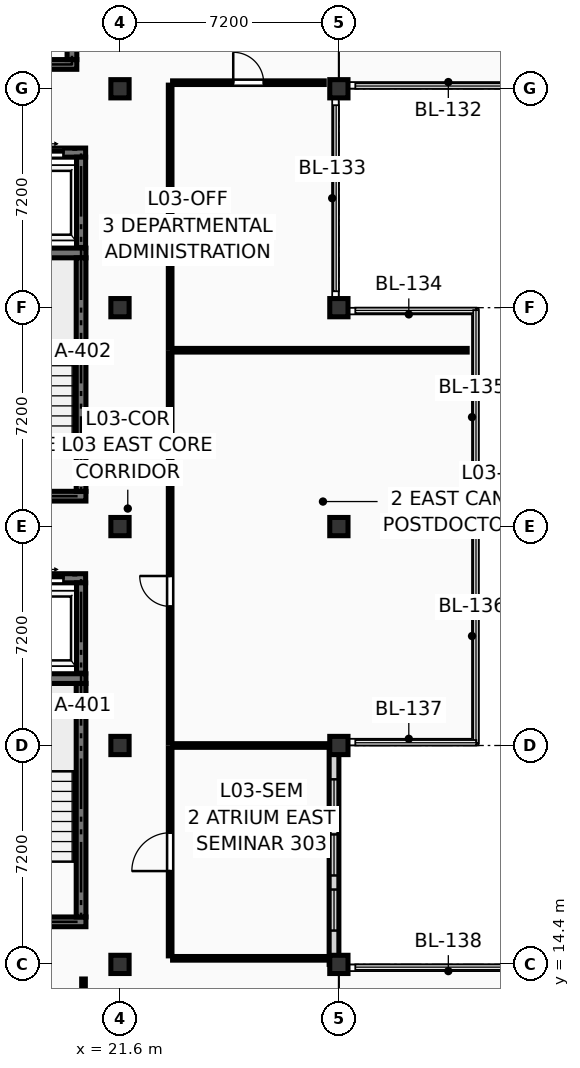
"""IFC4 building model, lengths in metres.
Left out: names, types, materials, properties, quantities, classifications, styles, units other than length and angle.
Written with IfcOpenShell. Run it as: python <this file> out.ifc"""

import sys

from ifc_helpers import new_model, si_unit, direction, frame, frame_2d, origin, origin_2d, place, context, subcontext, project, spatial, rectangle, extrude, element, fill, save


model = new_model("IFC4")
c1 = context("Model", 3, precision=1e-05, world=origin(), true_north=direction((0.0, 1.0)))
c2 = subcontext(c1, "Body", "Model", "MODEL_VIEW")
j1 = project(units=[si_unit("LENGTHUNIT", "METRE"), si_unit("PLANEANGLEUNIT", "RADIAN")], contexts=[c1])
p1 = place(None, origin())
s1 = spatial("IfcSite", under=j1, at=p1, CompositionType="ELEMENT")
p2 = place(p1, origin())
s2 = spatial("IfcBuilding", under=s1, at=p2, CompositionType="ELEMENT")
p3 = place(p2, frame((0.0, 0.0, 12.15)))
s3 = spatial("IfcBuildingStorey", under=s2, at=p3, CompositionType="ELEMENT", Elevation=12.15)
for number, where, z_axis, x_axis in (
    (1, (21.6, 14.4, 0.0), (0.0, 0.0, 1.0), (1.0, 0.0, 0.0)),
    (2, (21.6, 21.6, 0.0), (0.0, 0.0, 1.0), (1.0, 0.0, 0.0)),
    (3, (21.6, 28.8, 0.0), (0.0, 0.0, 1.0), (1.0, 0.0, 0.0)),
    (4, (21.6, 36.0, 0.0), (0.0, 0.0, 1.0), (1.0, 0.0, 0.0)),
    (5, (21.6, 43.2, 0.0), (0.0, 0.0, 1.0), (1.0, 0.0, 0.0)),
    (6, (28.8, 14.4, 0.0), (0.0, 0.0, 1.0), (1.0, 0.0, 0.0)),
    (7, (28.8, 21.6, 0.0), (0.0, 0.0, 1.0), (1.0, 0.0, 0.0)),
    (8, (28.8, 28.8, 0.0), (0.0, 0.0, 1.0), (1.0, 0.0, 0.0)),
    (9, (28.8, 36.0, 0.0), (0.0, 0.0, 1.0), (1.0, 0.0, 0.0)),
    (10, (28.8, 43.2, 0.0), (0.0, 0.0, 1.0), (1.0, 0.0, 0.0)),
):
    element("IfcColumn", number, at=place(p3, frame(where, z_axis=z_axis, x_axis=x_axis)), inside=s3, PredefinedType="COLUMN", context=c2, shape_type="SweptSolid", body=[
        extrude(rectangle(XDim=0.6, YDim=0.6, at=origin_2d()), origin(), (0.0, 0.0, 1.0), 3.6),
    ])
p4 = place(p3, frame((28.64, 14.4, 0.0), z_axis=(0.0, 0.0, 1.0), x_axis=(0.0, 1.0, 0.0)))
e11 = element("IfcWall", 11, at=p4, inside=s3, PredefinedType="SOLIDWALL", context=c2, shape_type="SweptSolid", body=[
    extrude(rectangle(XDim=7.2, YDim=0.32, at=frame_2d((3.6, 0.0))), origin(), (0.0, 0.0, 1.0), 2.84),
])
p5 = place(p4, frame((1.113, 0.0, 0.18)))
e12 = element("IfcOpeningElement", 12, at=p5, cuts=e11, PredefinedType="OPENING", context=c2, shape_type="SweptSolid", body=[
    extrude(rectangle(XDim=1.35, YDim=2.45, at=frame_2d((0.675, 1.225))), frame((0.0, 0.172, 0.0), z_axis=(0.0, -1.0, 0.0), x_axis=(1.0, 0.0, 0.0)), (0.0, 0.0, 1.0), 0.344),
])
p6 = place(p4, frame((2.925, 0.0, 0.18)))
e13 = element("IfcOpeningElement", 13, at=p6, cuts=e11, PredefinedType="OPENING", context=c2, shape_type="SweptSolid", body=[
    extrude(rectangle(XDim=1.35, YDim=2.45, at=frame_2d((0.675, 1.225))), frame((0.0, 0.172, 0.0), z_axis=(0.0, -1.0, 0.0), x_axis=(1.0, 0.0, 0.0)), (0.0, 0.0, 1.0), 0.344),
])
p7 = place(p4, frame((4.738, 0.0, 0.18)))
e14 = element("IfcOpeningElement", 14, at=p7, cuts=e11, PredefinedType="OPENING", context=c2, shape_type="SweptSolid", body=[
    extrude(rectangle(XDim=1.35, YDim=2.45, at=frame_2d((0.675, 1.225))), frame((0.0, 0.172, 0.0), z_axis=(0.0, -1.0, 0.0), x_axis=(1.0, 0.0, 0.0)), (0.0, 0.0, 1.0), 0.344),
])
for number, where, z_axis, x_axis in (
    (15, (15.64, 15.8, 0.0), (0.0, 0.0, 1.0), (1.0, 0.0, 0.0)),
    (16, (15.64, 23.8, 0.0), (0.0, 0.0, 1.0), (1.0, 0.0, 0.0)),
):
    element("IfcWall", number, at=place(p3, frame(where, z_axis=z_axis, x_axis=x_axis)), inside=s3, PredefinedType="SHEAR", context=c2, shape_type="SweptSolid", body=[
        extrude(rectangle(XDim=4.84, YDim=0.32, at=frame_2d((2.42, 0.0))), origin(), (0.0, 0.0, 1.0), 3.39),
    ])
p8 = place(p3, frame((20.32, 15.96, 0.0), z_axis=(0.0, 0.0, 1.0), x_axis=(0.0, 1.0, 0.0)))
e17 = element("IfcWall", 17, at=p8, inside=s3, PredefinedType="SHEAR", context=c2, shape_type="SweptSolid", body=[
    extrude(rectangle(XDim=7.68, YDim=0.32, at=frame_2d((3.84, 0.0))), origin(), (0.0, 0.0, 1.0), 3.39),
])
for number, where, z_axis, x_axis in (
    (18, (15.64, 29.8, 0.0), (0.0, 0.0, 1.0), (1.0, 0.0, 0.0)),
    (19, (15.64, 37.8, 0.0), (0.0, 0.0, 1.0), (1.0, 0.0, 0.0)),
):
    element("IfcWall", number, at=place(p3, frame(where, z_axis=z_axis, x_axis=x_axis)), inside=s3, PredefinedType="SHEAR", context=c2, shape_type="SweptSolid", body=[
        extrude(rectangle(XDim=4.84, YDim=0.32, at=frame_2d((2.42, 0.0))), origin(), (0.0, 0.0, 1.0), 3.39),
    ])
p9 = place(p3, frame((20.32, 29.96, 0.0), z_axis=(0.0, 0.0, 1.0), x_axis=(0.0, 1.0, 0.0)))
e20 = element("IfcWall", 20, at=p9, inside=s3, PredefinedType="SHEAR", context=c2, shape_type="SweptSolid", body=[
    extrude(rectangle(XDim=7.68, YDim=0.32, at=frame_2d((3.84, 0.0))), origin(), (0.0, 0.0, 1.0), 3.39),
])
p10 = place(p3, frame((15.74, 44.0, 0.0), z_axis=(0.0, 0.0, 1.0), x_axis=(1.0, 0.0, 0.0)))
e21 = element("IfcWall", 21, at=p10, inside=s3, PredefinedType="SHEAR", context=c2, shape_type="SweptSolid", body=[
    extrude(rectangle(XDim=4.44, YDim=0.32, at=frame_2d((2.22, 0.0))), origin(), (0.0, 0.0, 1.0), 3.39),
])
p11 = place(p3, frame((20.02, 44.16, 0.0), z_axis=(0.0, 0.0, 1.0), x_axis=(0.0, 1.0, 0.0)))
e22 = element("IfcWall", 22, at=p11, inside=s3, PredefinedType="SHEAR", context=c2, shape_type="SweptSolid", body=[
    extrude(rectangle(XDim=7.28, YDim=0.32, at=frame_2d((3.64, 0.0))), origin(), (0.0, 0.0, 1.0), 3.39),
])
p12 = place(p3, frame((17.91, 27.1, 0.0), z_axis=(0.0, 0.0, 1.0), x_axis=(1.0, 0.0, 0.0)))
e23 = element("IfcWall", 23, at=p12, inside=s3, PredefinedType="SHEAR", context=c2, shape_type="SweptSolid", body=[
    extrude(rectangle(XDim=2.56, YDim=0.3, at=frame_2d((1.28, 0.0))), origin(), (0.0, 0.0, 1.0), 3.39),
])
p13 = place(p12, frame((0.73, 0.0, 0.0)))
e24 = element("IfcOpeningElement", 24, at=p13, cuts=e23, PredefinedType="OPENING", context=c2, shape_type="SweptSolid", body=[
    extrude(rectangle(XDim=1.1, YDim=2.2, at=frame_2d((0.55, 1.1))), frame((0.0, 0.162, 0.0), z_axis=(0.0, -1.0, 0.0), x_axis=(1.0, 0.0, 0.0)), (0.0, 0.0, 1.0), 0.324),
])
p14 = place(p3, frame((20.32, 23.98, 0.0), z_axis=(0.0, 0.0, 1.0), x_axis=(0.0, 1.0, 0.0)))
e25 = element("IfcWall", 25, at=p14, inside=s3, PredefinedType="SHEAR", context=c2, shape_type="SweptSolid", body=[
    extrude(rectangle(XDim=2.97, YDim=0.3, at=frame_2d((1.485, 0.0))), origin(), (0.0, 0.0, 1.0), 3.39),
])
p15 = place(p3, frame((17.91, 41.1, 0.0), z_axis=(0.0, 0.0, 1.0), x_axis=(1.0, 0.0, 0.0)))
e26 = element("IfcWall", 26, at=p15, inside=s3, PredefinedType="SHEAR", context=c2, shape_type="SweptSolid", body=[
    extrude(rectangle(XDim=2.56, YDim=0.3, at=frame_2d((1.28, 0.0))), origin(), (0.0, 0.0, 1.0), 3.39),
])
p16 = place(p15, frame((0.73, 0.0, 0.0)))
e27 = element("IfcOpeningElement", 27, at=p16, cuts=e26, PredefinedType="OPENING", context=c2, shape_type="SweptSolid", body=[
    extrude(rectangle(XDim=1.1, YDim=2.2, at=frame_2d((0.55, 1.1))), frame((0.0, 0.162, 0.0), z_axis=(0.0, -1.0, 0.0), x_axis=(1.0, 0.0, 0.0)), (0.0, 0.0, 1.0), 0.324),
])
p17 = place(p3, frame((20.32, 37.98, 0.0), z_axis=(0.0, 0.0, 1.0), x_axis=(0.0, 1.0, 0.0)))
e28 = element("IfcWall", 28, at=p17, inside=s3, PredefinedType="SHEAR", context=c2, shape_type="SweptSolid", body=[
    extrude(rectangle(XDim=2.97, YDim=0.3, at=frame_2d((1.485, 0.0))), origin(), (0.0, 0.0, 1.0), 3.39),
])
p18 = place(p3, frame((20.4, 9.48, 0.0), z_axis=(0.0, 0.0, 1.0), x_axis=(0.0, 1.0, 0.0)))
e29 = element("IfcWall", 29, at=p18, inside=s3, PredefinedType="PARTITIONING", context=c2, shape_type="SweptSolid", body=[
    extrude(rectangle(XDim=4.44, YDim=0.12, at=frame_2d((2.22, 0.0))), origin(), (0.0, 0.0, 1.0), 3.375),
])
p19 = place(p3, frame((23.25, 14.68, 0.0), z_axis=(0.0, 0.0, 1.0), x_axis=(0.0, 1.0, 0.0)))
e30 = element("IfcWall", 30, at=p19, inside=s3, PredefinedType="PARTITIONING", context=c2, shape_type="SweptSolid", body=[
    extrude(rectangle(XDim=6.84, YDim=0.12, at=frame_2d((3.42, 0.0))), origin(), (0.0, 0.0, 1.0), 3.375),
])
p20 = place(p19, frame((2.79, 0.0, 0.0)))
e31 = element("IfcOpeningElement", 31, at=p20, cuts=e30, PredefinedType="OPENING", context=c2, shape_type="SweptSolid", body=[
    extrude(rectangle(XDim=1.26, YDim=2.18, at=frame_2d((0.63, 1.09))), frame((0.0, 0.072, 0.0), z_axis=(0.0, -1.0, 0.0), x_axis=(1.0, 0.0, 0.0)), (0.0, 0.0, 1.0), 0.144),
])
p21 = place(p3, frame((23.33, 14.6, 0.0), z_axis=(0.0, 0.0, 1.0), x_axis=(1.0, 0.0, 0.0)))
e32 = element("IfcWall", 32, at=p21, inside=s3, PredefinedType="PARTITIONING", context=c2, shape_type="SweptSolid", body=[
    extrude(rectangle(XDim=5.09, YDim=0.12, at=frame_2d((2.545, 0.0))), origin(), (0.0, 0.0, 1.0), 2.595),
])
p22 = place(p3, frame((23.33, 21.6, 0.0), z_axis=(0.0, 0.0, 1.0), x_axis=(1.0, 0.0, 0.0)))
e33 = element("IfcWall", 33, at=p22, inside=s3, PredefinedType="PARTITIONING", context=c2, shape_type="SweptSolid", body=[
    extrude(rectangle(XDim=5.09, YDim=0.12, at=frame_2d((2.545, 0.0))), origin(), (0.0, 0.0, 1.0), 2.691),
])
p23 = place(p3, frame((23.25, 21.68, 0.0), z_axis=(0.0, 0.0, 1.0), x_axis=(0.0, 1.0, 0.0)))
e34 = element("IfcWall", 34, at=p23, inside=s3, PredefinedType="PARTITIONING", context=c2, shape_type="SweptSolid", body=[
    extrude(rectangle(XDim=12.84, YDim=0.12, at=frame_2d((6.42, 0.0))), origin(), (0.0, 0.0, 1.0), 3.375),
])
p24 = place(p23, frame((4.495, 0.0, 0.0)))
e35 = element("IfcOpeningElement", 35, at=p24, cuts=e34, PredefinedType="OPENING", context=c2, shape_type="SweptSolid", body=[
    extrude(rectangle(XDim=1.0, YDim=2.15, at=frame_2d((0.5, 1.075))), frame((0.0, 0.072, 0.0), z_axis=(0.0, -1.0, 0.0), x_axis=(1.0, 0.0, 0.0)), (0.0, 0.0, 1.0), 0.144),
])
p25 = place(p3, frame((23.33, 34.6, 0.0), z_axis=(0.0, 0.0, 1.0), x_axis=(1.0, 0.0, 0.0)))
e36 = element("IfcWall", 36, at=p25, inside=s3, PredefinedType="PARTITIONING", context=c2, shape_type="SweptSolid", body=[
    extrude(rectangle(XDim=9.69, YDim=0.12, at=frame_2d((4.845, 0.0))), origin(), (0.0, 0.0, 1.0), 3.375),
])
p26 = place(p3, frame((23.25, 34.68, 0.0), z_axis=(0.0, 0.0, 1.0), x_axis=(0.0, 1.0, 0.0)))
e37 = element("IfcWall", 37, at=p26, inside=s3, PredefinedType="PARTITIONING", context=c2, shape_type="SweptSolid", body=[
    extrude(rectangle(XDim=8.64, YDim=0.12, at=frame_2d((4.32, 0.0))), origin(), (0.0, 0.0, 1.0), 3.375),
])
p27 = place(p3, frame((23.33, 43.4, 0.0), z_axis=(0.0, 0.0, 1.0), x_axis=(1.0, 0.0, 0.0)))
e38 = element("IfcWall", 38, at=p27, inside=s3, PredefinedType="PARTITIONING", context=c2, shape_type="SweptSolid", body=[
    extrude(rectangle(XDim=4.99, YDim=0.12, at=frame_2d((2.495, 0.0))), origin(), (0.0, 0.0, 1.0), 2.691),
])
p28 = place(p27, frame((1.995, 0.0, 0.0)))
e39 = element("IfcOpeningElement", 39, at=p28, cuts=e38, PredefinedType="OPENING", context=c2, shape_type="SweptSolid", body=[
    extrude(rectangle(XDim=1.0, YDim=2.15, at=frame_2d((0.5, 1.075))), frame((0.0, 0.072, 0.0), z_axis=(0.0, -1.0, 0.0), x_axis=(1.0, 0.0, 0.0)), (0.0, 0.0, 1.0), 0.144),
])
p29 = place(p5, origin())
e40 = element("IfcWindow", 40, at=p29, inside=s3, PartitioningType="SINGLE_PANEL", PredefinedType="WINDOW", context=c2, shape_type="SweptSolid", body=[
    extrude(rectangle(XDim=1.35, YDim=2.45, at=frame_2d((0.675, 1.225))), frame((0.0, 0.03, 0.0), z_axis=(0.0, -1.0, 0.0), x_axis=(1.0, 0.0, 0.0)), (0.0, 0.0, 1.0), 0.06),
])
fill(e12, e40)
p30 = place(p6, origin())
e41 = element("IfcWindow", 41, at=p30, inside=s3, PartitioningType="SINGLE_PANEL", PredefinedType="WINDOW", context=c2, shape_type="SweptSolid", body=[
    extrude(rectangle(XDim=1.35, YDim=2.45, at=frame_2d((0.675, 1.225))), frame((0.0, 0.03, 0.0), z_axis=(0.0, -1.0, 0.0), x_axis=(1.0, 0.0, 0.0)), (0.0, 0.0, 1.0), 0.06),
])
fill(e13, e41)
p31 = place(p7, origin())
e42 = element("IfcWindow", 42, at=p31, inside=s3, PartitioningType="SINGLE_PANEL", PredefinedType="WINDOW", context=c2, shape_type="SweptSolid", body=[
    extrude(rectangle(XDim=1.35, YDim=2.45, at=frame_2d((0.675, 1.225))), frame((0.0, 0.03, 0.0), z_axis=(0.0, -1.0, 0.0), x_axis=(1.0, 0.0, 0.0)), (0.0, 0.0, 1.0), 0.06),
])
fill(e14, e42)
p32 = place(p13, origin())
e43 = element("IfcDoor", 43, at=p32, inside=s3, OperationType="DOUBLE_DOOR_SLIDING", PredefinedType="DOOR", context=c2, shape_type="SweptSolid", body=[
    extrude(rectangle(XDim=1.1, YDim=2.2, at=frame_2d((0.55, 1.1))), frame((0.0, 0.025, 0.0), z_axis=(0.0, -1.0, 0.0), x_axis=(1.0, 0.0, 0.0)), (0.0, 0.0, 1.0), 0.05),
])
fill(e24, e43)
p33 = place(p16, origin())
e44 = element("IfcDoor", 44, at=p33, inside=s3, OperationType="DOUBLE_DOOR_SLIDING", PredefinedType="DOOR", context=c2, shape_type="SweptSolid", body=[
    extrude(rectangle(XDim=1.1, YDim=2.2, at=frame_2d((0.55, 1.1))), frame((0.0, 0.025, 0.0), z_axis=(0.0, -1.0, 0.0), x_axis=(1.0, 0.0, 0.0)), (0.0, 0.0, 1.0), 0.05),
])
fill(e27, e44)
p34 = place(p20, origin())
e45 = element("IfcDoor", 45, at=p34, inside=s3, OperationType="SINGLE_SWING_LEFT", PredefinedType="DOOR", context=c2, shape_type="SweptSolid", body=[
    extrude(rectangle(XDim=1.26, YDim=2.18, at=frame_2d((0.63, 1.09))), frame((0.0, 0.025, 0.0), z_axis=(0.0, -1.0, 0.0), x_axis=(1.0, 0.0, 0.0)), (0.0, 0.0, 1.0), 0.05),
])
fill(e31, e45)
p35 = place(p24, origin())
e46 = element("IfcDoor", 46, at=p35, inside=s3, OperationType="SINGLE_SWING_RIGHT", PredefinedType="DOOR", context=c2, shape_type="SweptSolid", body=[
    extrude(rectangle(XDim=1.0, YDim=2.15, at=frame_2d((0.5, 1.075))), frame((0.0, 0.025, 0.0), z_axis=(0.0, -1.0, 0.0), x_axis=(1.0, 0.0, 0.0)), (0.0, 0.0, 1.0), 0.05),
])
fill(e35, e46)
p36 = place(p28, origin())
e47 = element("IfcDoor", 47, at=p36, inside=s3, OperationType="SINGLE_SWING_LEFT", PredefinedType="DOOR", context=c2, shape_type="SweptSolid", body=[
    extrude(rectangle(XDim=1.0, YDim=2.15, at=frame_2d((0.5, 1.075))), frame((0.0, 0.025, 0.0), z_axis=(0.0, -1.0, 0.0), x_axis=(1.0, 0.0, 0.0)), (0.0, 0.0, 1.0), 0.05),
])
fill(e39, e47)
save(model, sys.argv[1])
